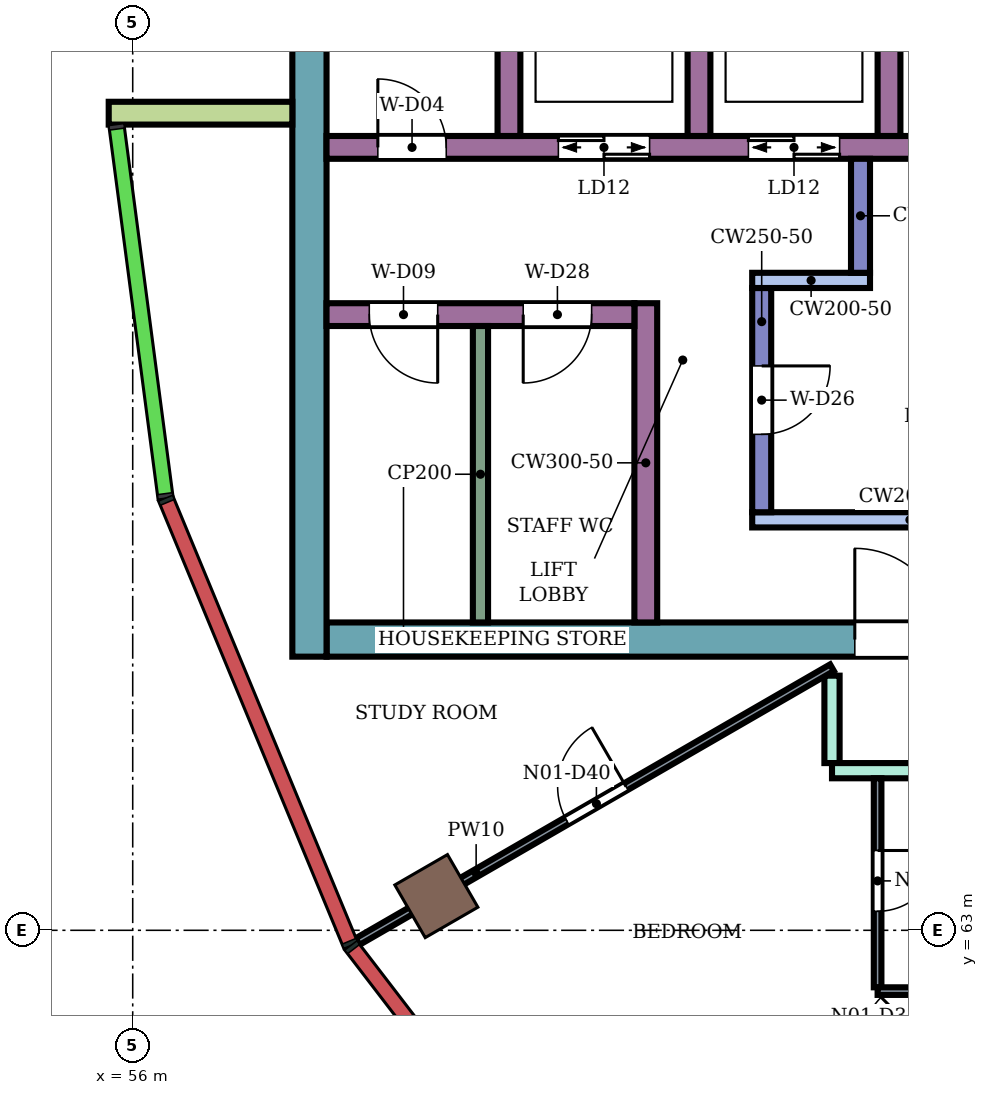
"""IFC4 building model, lengths in metres.
Left out: names, types, materials, properties, quantities, classifications, styles, units other than length and angle.
Written with IfcOpenShell. Run it as: python <this file> out.ifc"""

import sys

from ifc_helpers import new_model, si_unit, direction, frame, frame_2d, origin, origin_2d, place, context, subcontext, project, spatial, rectangle, extrude, element, fill, save


model = new_model("IFC4")
c1 = context("Model", 3, precision=1e-05, world=origin(), true_north=direction((0.0, 1.0)))
c2 = subcontext(c1, "Body", "Model", "MODEL_VIEW")
j1 = project(units=[si_unit("LENGTHUNIT", "METRE"), si_unit("PLANEANGLEUNIT", "RADIAN")], contexts=[c1])
p1 = place(None, origin())
s1 = spatial("IfcSite", under=j1, at=p1, CompositionType="ELEMENT")
p2 = place(p1, origin())
s2 = spatial("IfcBuilding", under=s1, at=p2, CompositionType="ELEMENT")
p3 = place(p2, frame((0.0, 0.0, 284.1)))
s3 = spatial("IfcBuildingStorey", under=s2, at=p3, CompositionType="ELEMENT", Elevation=284.1)
p4 = place(p3, frame((59.995, 63.45, 0.0), z_axis=(0.0, 0.0, 1.0), x_axis=(-0.866025403784, -0.5, 0.0)))
e1 = element("IfcColumn", 1, at=p4, inside=s3, PredefinedType="COLUMN", context=c2, shape_type="SweptSolid", body=[
    extrude(rectangle(XDim=0.8, YDim=0.8, at=origin_2d()), origin(), (0.0, 0.0, 1.0), 4.2),
])
p5 = place(p3, frame((72.1, 66.825, 0.0), z_axis=(0.0, 0.0, 1.0), x_axis=(-1.0, 0.0, 0.0)))
e2 = element("IfcWall", 2, at=p5, inside=s3, PredefinedType="SHEAR", context=c2, shape_type="SweptSolid", body=[
    extrude(rectangle(XDim=13.55, YDim=0.45, at=frame_2d((6.775, 0.0))), origin(), (0.0, 0.0, 1.0), 3.88),
])
p6 = place(p5, frame((4.2, 0.0, 0.0)))
e3 = element("IfcOpeningElement", 3, at=p6, cuts=e2, PredefinedType="OPENING", context=c2, shape_type="SweptSolid", body=[
    extrude(rectangle(XDim=2.4, YDim=2.4, at=frame_2d((1.2, 1.2))), frame((0.0, 0.235, 0.0), z_axis=(0.0, -1.0, 0.0), x_axis=(1.0, 0.0, 0.0)), (0.0, 0.0, 1.0), 0.47),
])
p7 = place(p3, frame((58.325, 83.4, 0.0), z_axis=(0.0, 0.0, 1.0), x_axis=(0.0, -1.0, 0.0)))
e4 = element("IfcWall", 4, at=p7, inside=s3, PredefinedType="SHEAR", context=c2, shape_type="SweptSolid", body=[
    extrude(rectangle(XDim=16.8, YDim=0.45, at=frame_2d((8.4, 0.0))), origin(), (0.0, 0.0, 1.0), 3.88),
])
p8 = place(p3, frame((68.3, 73.3, 0.0), z_axis=(0.0, 0.0, 1.0), x_axis=(-1.0, 0.0, 0.0)))
e5 = element("IfcWall", 5, at=p8, inside=s3, PredefinedType="SHEAR", context=c2, shape_type="SweptSolid", body=[
    extrude(rectangle(XDim=9.75, YDim=0.3, at=frame_2d((4.875, 0.0))), origin(), (0.0, 0.0, 1.0), 3.88),
])
p9 = place(p8, frame((0.55, 0.0, 0.0)))
e6 = element("IfcOpeningElement", 6, at=p9, cuts=e5, PredefinedType="OPENING", context=c2, shape_type="SweptSolid", body=[
    extrude(rectangle(XDim=1.1, YDim=2.1, at=frame_2d((0.55, 1.05))), frame((0.0, 0.16, 0.0), z_axis=(0.0, -1.0, 0.0), x_axis=(1.0, 0.0, 0.0)), (0.0, 0.0, 1.0), 0.32),
])
p10 = place(p8, frame((3.0, 0.0, 0.0)))
e7 = element("IfcOpeningElement", 7, at=p10, cuts=e5, PredefinedType="OPENING", context=c2, shape_type="SweptSolid", body=[
    extrude(rectangle(XDim=1.2, YDim=2.1, at=frame_2d((0.6, 1.05))), frame((0.0, 0.16, 0.0), z_axis=(0.0, -1.0, 0.0), x_axis=(1.0, 0.0, 0.0)), (0.0, 0.0, 1.0), 0.32),
])
p11 = place(p8, frame((5.5, 0.0, 0.0)))
e8 = element("IfcOpeningElement", 8, at=p11, cuts=e5, PredefinedType="OPENING", context=c2, shape_type="SweptSolid", body=[
    extrude(rectangle(XDim=1.2, YDim=2.1, at=frame_2d((0.6, 1.05))), frame((0.0, 0.16, 0.0), z_axis=(0.0, -1.0, 0.0), x_axis=(1.0, 0.0, 0.0)), (0.0, 0.0, 1.0), 0.32),
])
p12 = place(p8, frame((8.175, 0.0, 0.0)))
e9 = element("IfcOpeningElement", 9, at=p12, cuts=e5, PredefinedType="OPENING", context=c2, shape_type="SweptSolid", body=[
    extrude(rectangle(XDim=0.9, YDim=2.1, at=frame_2d((0.45, 1.05))), frame((0.0, 0.16, 0.0), z_axis=(0.0, -1.0, 0.0), x_axis=(1.0, 0.0, 0.0)), (0.0, 0.0, 1.0), 0.32),
])
for number, where, z_axis, x_axis in (
    (10, (65.95, 76.0, 0.0), (0.0, 0.0, 1.0), (0.0, -1.0, 0.0)),
    (11, (63.45, 76.0, 0.0), (0.0, 0.0, 1.0), (0.0, -1.0, 0.0)),
    (12, (60.95, 76.0, 0.0), (0.0, 0.0, 1.0), (0.0, -1.0, 0.0)),
):
    element("IfcWall", number, at=place(p3, frame(where, z_axis=z_axis, x_axis=x_axis)), inside=s3, PredefinedType="SHEAR", context=c2, shape_type="SweptSolid", body=[
        extrude(rectangle(XDim=2.55, YDim=0.3, at=frame_2d((1.275, 0.0))), origin(), (0.0, 0.0, 1.0), 3.88),
    ])
p13 = place(p3, frame((68.3, 68.4, 0.0), z_axis=(0.0, 0.0, 1.0), x_axis=(-1.0, 0.0, 0.0)))
e13 = element("IfcWall", 13, at=p13, inside=s3, PredefinedType="SHEAR", context=c2, shape_type="SweptSolid", body=[
    extrude(rectangle(XDim=4.15, YDim=0.2, at=frame_2d((2.075, 0.0))), origin(), (0.0, 0.0, 1.0), 3.88),
])
p14 = place(p3, frame((64.275, 71.45, 0.0), z_axis=(0.0, 0.0, 1.0), x_axis=(0.0, -1.0, 0.0)))
e14 = element("IfcWall", 14, at=p14, inside=s3, PredefinedType="SHEAR", context=c2, shape_type="SweptSolid", body=[
    extrude(rectangle(XDim=2.95, YDim=0.25, at=frame_2d((1.475, 0.0))), origin(), (0.0, 0.0, 1.0), 3.88),
])
p15 = place(p14, frame((1.025, 0.0, 0.0)))
e15 = element("IfcOpeningElement", 15, at=p15, cuts=e14, PredefinedType="OPENING", context=c2, shape_type="SweptSolid", body=[
    extrude(rectangle(XDim=0.9, YDim=2.1, at=frame_2d((0.45, 1.05))), frame((0.0, 0.135, 0.0), z_axis=(0.0, -1.0, 0.0), x_axis=(1.0, 0.0, 0.0)), (0.0, 0.0, 1.0), 0.27),
])
p16 = place(p3, frame((65.7, 71.55, 0.0), z_axis=(0.0, 0.0, 1.0), x_axis=(-1.0, 0.0, 0.0)))
e16 = element("IfcWall", 16, at=p16, inside=s3, PredefinedType="SHEAR", context=c2, shape_type="SweptSolid", body=[
    extrude(rectangle(XDim=1.55, YDim=0.2, at=frame_2d((0.775, 0.0))), origin(), (0.0, 0.0, 1.0), 3.88),
])
p17 = place(p3, frame((65.575, 73.15, 0.0), z_axis=(0.0, 0.0, 1.0), x_axis=(0.0, -1.0, 0.0)))
e17 = element("IfcWall", 17, at=p17, inside=s3, PredefinedType="SHEAR", context=c2, shape_type="SweptSolid", body=[
    extrude(rectangle(XDim=1.5, YDim=0.25, at=frame_2d((0.75, 0.0))), origin(), (0.0, 0.0, 1.0), 3.88),
])
p18 = place(p3, frame((62.75, 71.25, 0.0), z_axis=(0.0, 0.0, 1.0), x_axis=(0.0, -1.0, 0.0)))
e18 = element("IfcWall", 18, at=p18, inside=s3, PredefinedType="SHEAR", context=c2, shape_type="SweptSolid", body=[
    extrude(rectangle(XDim=4.2, YDim=0.3, at=frame_2d((2.1, 0.0))), origin(), (0.0, 0.0, 1.0), 3.88),
])
p19 = place(p3, frame((62.6, 71.1, 0.0), z_axis=(0.0, 0.0, 1.0), x_axis=(-1.0, 0.0, 0.0)))
e19 = element("IfcWall", 19, at=p19, inside=s3, PredefinedType="SHEAR", context=c2, shape_type="SweptSolid", body=[
    extrude(rectangle(XDim=4.05, YDim=0.3, at=frame_2d((2.025, 0.0))), origin(), (0.0, 0.0, 1.0), 3.88),
])
p20 = place(p19, frame((0.562, 0.0, 0.0)))
e20 = element("IfcOpeningElement", 20, at=p20, cuts=e19, PredefinedType="OPENING", context=c2, shape_type="SweptSolid", body=[
    extrude(rectangle(XDim=0.9, YDim=2.1, at=frame_2d((0.45, 1.05))), frame((0.0, 0.16, 0.0), z_axis=(0.0, -1.0, 0.0), x_axis=(1.0, 0.0, 0.0)), (0.0, 0.0, 1.0), 0.32),
])
p21 = place(p19, frame((2.587, 0.0, 0.0)))
e21 = element("IfcOpeningElement", 21, at=p21, cuts=e19, PredefinedType="OPENING", context=c2, shape_type="SweptSolid", body=[
    extrude(rectangle(XDim=0.9, YDim=2.1, at=frame_2d((0.45, 1.05))), frame((0.0, 0.16, 0.0), z_axis=(0.0, -1.0, 0.0), x_axis=(1.0, 0.0, 0.0)), (0.0, 0.0, 1.0), 0.32),
])
p22 = place(p3, frame((58.1, 73.75, 0.0), z_axis=(0.0, 0.0, 1.0), x_axis=(-1.0, 0.0, 0.0)))
e22 = element("IfcWall", 22, at=p22, inside=s3, PredefinedType="NOTDEFINED", context=c2, shape_type="SweptSolid", body=[
    extrude(rectangle(XDim=2.416, YDim=0.3, at=frame_2d((1.208, 0.0))), origin(), (0.0, 0.0, 1.0), 4.2),
])
p23 = place(p3, frame((65.2, 65.2, 0.0), z_axis=(0.0, 0.0, 1.0), x_axis=(0.0, 1.0, 0.0)))
e23 = element("IfcWall", 23, at=p23, inside=s3, PredefinedType="PARTITIONING", context=c2, shape_type="SweptSolid", body=[
    extrude(rectangle(XDim=1.15, YDim=0.2, at=frame_2d((0.575, 0.0))), origin(), (0.0, 0.0, 1.0), 3.75),
])
p24 = place(p3, frame((65.2, 65.1, 0.0), z_axis=(0.0, 0.0, 1.0), x_axis=(1.0, 0.0, 0.0)))
e24 = element("IfcWall", 24, at=p24, inside=s3, PredefinedType="PARTITIONING", context=c2, shape_type="SweptSolid", body=[
    extrude(rectangle(XDim=2.98, YDim=0.2, at=frame_2d((1.49, 0.0))), origin(), (0.0, 0.0, 1.0), 3.75),
])
p25 = place(p3, frame((58.958, 62.851, 0.0), z_axis=(0.0, 0.0, 1.0), x_axis=(0.866044015472, 0.499967762227, 0.0)))
e25 = element("IfcWall", 25, at=p25, inside=s3, PredefinedType="PARTITIONING", context=c2, shape_type="SweptSolid", body=[
    extrude(rectangle(XDim=7.208, YDim=0.1, at=frame_2d((3.604, 0.0))), origin(), (0.0, 0.0, 1.0), 3.75),
])
p26 = place(p25, frame((3.179, 0.0, 0.0)))
e26 = element("IfcOpeningElement", 26, at=p26, cuts=e25, PredefinedType="OPENING", context=c2, shape_type="SweptSolid", body=[
    extrude(rectangle(XDim=0.9, YDim=2.1, at=frame_2d((0.45, 1.05))), frame((0.0, 0.06, 0.0), z_axis=(0.0, -1.0, 0.0), x_axis=(1.0, 0.0, 0.0)), (0.0, 0.0, 1.0), 0.12),
])
p27 = place(p3, frame((64.656, 59.656, 0.0), z_axis=(0.0, 0.0, 1.0), x_axis=(0.707106781187, 0.707106781187, 0.0)))
e27 = element("IfcWall", 27, at=p27, inside=s3, PredefinedType="PARTITIONING", context=c2, shape_type="SweptSolid", body=[
    extrude(rectangle(XDim=7.22, YDim=0.1, at=frame_2d((3.61, 0.0))), origin(), (0.0, 0.0, 1.0), 3.75),
])
p28 = place(p27, frame((1.684, 0.0, 0.0)))
e28 = element("IfcOpeningElement", 28, at=p28, cuts=e27, PredefinedType="OPENING", context=c2, shape_type="SweptSolid", body=[
    extrude(rectangle(XDim=0.9, YDim=2.1, at=frame_2d((0.45, 1.05))), frame((0.0, 0.06, 0.0), z_axis=(0.0, -1.0, 0.0), x_axis=(1.0, 0.0, 0.0)), (0.0, 0.0, 1.0), 0.12),
])
p29 = place(p3, frame((65.8, 62.25, 0.0), z_axis=(0.0, 0.0, 1.0), x_axis=(0.0, 1.0, 0.0)))
e29 = element("IfcWall", 29, at=p29, inside=s3, PredefinedType="PARTITIONING", context=c2, shape_type="SweptSolid", body=[
    extrude(rectangle(XDim=2.75, YDim=0.1, at=frame_2d((1.375, 0.0))), origin(), (0.0, 0.0, 1.0), 3.75),
])
p30 = place(p29, frame((1.0, 0.0, 0.0)))
e30 = element("IfcOpeningElement", 30, at=p30, cuts=e29, PredefinedType="OPENING", context=c2, shape_type="SweptSolid", body=[
    extrude(rectangle(XDim=0.8, YDim=2.1, at=frame_2d((0.4, 1.05))), frame((0.0, 0.06, 0.0), z_axis=(0.0, -1.0, 0.0), x_axis=(1.0, 0.0, 0.0)), (0.0, 0.0, 1.0), 0.12),
])
p31 = place(p3, frame((65.8, 62.2, 0.0), z_axis=(0.0, 0.0, 1.0), x_axis=(1.0, 0.0, 0.0)))
e31 = element("IfcWall", 31, at=p31, inside=s3, PredefinedType="PARTITIONING", context=c2, shape_type="SweptSolid", body=[
    extrude(rectangle(XDim=1.29, YDim=0.1, at=frame_2d((0.645, 0.0))), origin(), (0.0, 0.0, 1.0), 3.75),
])
p32 = place(p3, frame((60.575, 70.95, 0.0), z_axis=(0.0, 0.0, 1.0), x_axis=(0.0, -1.0, 0.0)))
e32 = element("IfcWall", 32, at=p32, inside=s3, PredefinedType="PARTITIONING", context=c2, shape_type="SweptSolid", body=[
    extrude(rectangle(XDim=3.9, YDim=0.2, at=frame_2d((1.95, 0.0))), origin(), (0.0, 0.0, 1.0), 3.88),
])
p33 = place(p30, frame((0.8, 0.0, 0.0), z_axis=(0.0, 0.0, 1.0), x_axis=(-1.0, 0.0, 0.0)))
e33 = element("IfcDoor", 33, at=p33, inside=s3, OperationType="SINGLE_SWING_LEFT", PredefinedType="DOOR", context=c2, shape_type="SweptSolid", body=[
    extrude(rectangle(XDim=0.8, YDim=2.1, at=frame_2d((0.4, 1.05))), frame((0.0, 0.025, 0.0), z_axis=(0.0, -1.0, 0.0), x_axis=(1.0, 0.0, 0.0)), (0.0, 0.0, 1.0), 0.05),
])
fill(e30, e33)
p34 = place(p26, origin())
e34 = element("IfcDoor", 34, at=p34, inside=s3, OperationType="SINGLE_SWING_RIGHT", PredefinedType="DOOR", context=c2, shape_type="SweptSolid", body=[
    extrude(rectangle(XDim=0.9, YDim=2.1, at=frame_2d((0.45, 1.05))), frame((0.0, 0.025, 0.0), z_axis=(0.0, -1.0, 0.0), x_axis=(1.0, 0.0, 0.0)), (0.0, 0.0, 1.0), 0.05),
])
fill(e26, e34)
p35 = place(p10, origin())
e35 = element("IfcDoor", 35, at=p35, inside=s3, OperationType="DOUBLE_DOOR_SLIDING", PredefinedType="DOOR", context=c2, shape_type="SweptSolid", body=[
    extrude(rectangle(XDim=1.2, YDim=2.1, at=frame_2d((0.6, 1.05))), frame((0.0, 0.025, 0.0), z_axis=(0.0, -1.0, 0.0), x_axis=(1.0, 0.0, 0.0)), (0.0, 0.0, 1.0), 0.05),
])
fill(e7, e35)
p36 = place(p11, origin())
e36 = element("IfcDoor", 36, at=p36, inside=s3, OperationType="DOUBLE_DOOR_SLIDING", PredefinedType="DOOR", context=c2, shape_type="SweptSolid", body=[
    extrude(rectangle(XDim=1.2, YDim=2.1, at=frame_2d((0.6, 1.05))), frame((0.0, 0.025, 0.0), z_axis=(0.0, -1.0, 0.0), x_axis=(1.0, 0.0, 0.0)), (0.0, 0.0, 1.0), 0.05),
])
fill(e8, e36)
p37 = place(p12, frame((0.9, 0.0, 0.0), z_axis=(0.0, 0.0, 1.0), x_axis=(-1.0, 0.0, 0.0)))
e37 = element("IfcDoor", 37, at=p37, inside=s3, OperationType="SINGLE_SWING_LEFT", PredefinedType="DOOR", context=c2, shape_type="SweptSolid", body=[
    extrude(rectangle(XDim=0.9, YDim=2.1, at=frame_2d((0.45, 1.05))), frame((0.0, 0.025, 0.0), z_axis=(0.0, -1.0, 0.0), x_axis=(1.0, 0.0, 0.0)), (0.0, 0.0, 1.0), 0.05),
])
fill(e9, e37)
p38 = place(p15, origin())
e38 = element("IfcDoor", 38, at=p38, inside=s3, OperationType="SINGLE_SWING_LEFT", PredefinedType="DOOR", context=c2, shape_type="SweptSolid", body=[
    extrude(rectangle(XDim=0.9, YDim=2.1, at=frame_2d((0.45, 1.05))), frame((0.0, 0.025, 0.0), z_axis=(0.0, -1.0, 0.0), x_axis=(1.0, 0.0, 0.0)), (0.0, 0.0, 1.0), 0.05),
])
fill(e15, e38)
p39 = place(p20, origin())
e39 = element("IfcDoor", 39, at=p39, inside=s3, OperationType="SINGLE_SWING_RIGHT", PredefinedType="DOOR", context=c2, shape_type="SweptSolid", body=[
    extrude(rectangle(XDim=0.9, YDim=2.1, at=frame_2d((0.45, 1.05))), frame((0.0, 0.025, 0.0), z_axis=(0.0, -1.0, 0.0), x_axis=(1.0, 0.0, 0.0)), (0.0, 0.0, 1.0), 0.05),
])
fill(e20, e39)
p40 = place(p21, origin())
e40 = element("IfcDoor", 40, at=p40, inside=s3, OperationType="SINGLE_SWING_LEFT", PredefinedType="DOOR", context=c2, shape_type="SweptSolid", body=[
    extrude(rectangle(XDim=0.9, YDim=2.1, at=frame_2d((0.45, 1.05))), frame((0.0, 0.025, 0.0), z_axis=(0.0, -1.0, 0.0), x_axis=(1.0, 0.0, 0.0)), (0.0, 0.0, 1.0), 0.05),
])
fill(e21, e40)
p41 = place(p6, frame((2.4, 0.0, 0.0), z_axis=(0.0, 0.0, 1.0), x_axis=(-1.0, 0.0, 0.0)))
e41 = element("IfcDoor", 41, at=p41, inside=s3, OperationType="DOUBLE_DOOR_SINGLE_SWING", PredefinedType="DOOR", context=c2, shape_type="SweptSolid", body=[
    extrude(rectangle(XDim=2.4, YDim=2.4, at=frame_2d((1.2, 1.2))), frame((0.0, 0.025, 0.0), z_axis=(0.0, -1.0, 0.0), x_axis=(1.0, 0.0, 0.0)), (0.0, 0.0, 1.0), 0.05),
])
fill(e3, e41)
save(model, sys.argv[1])
